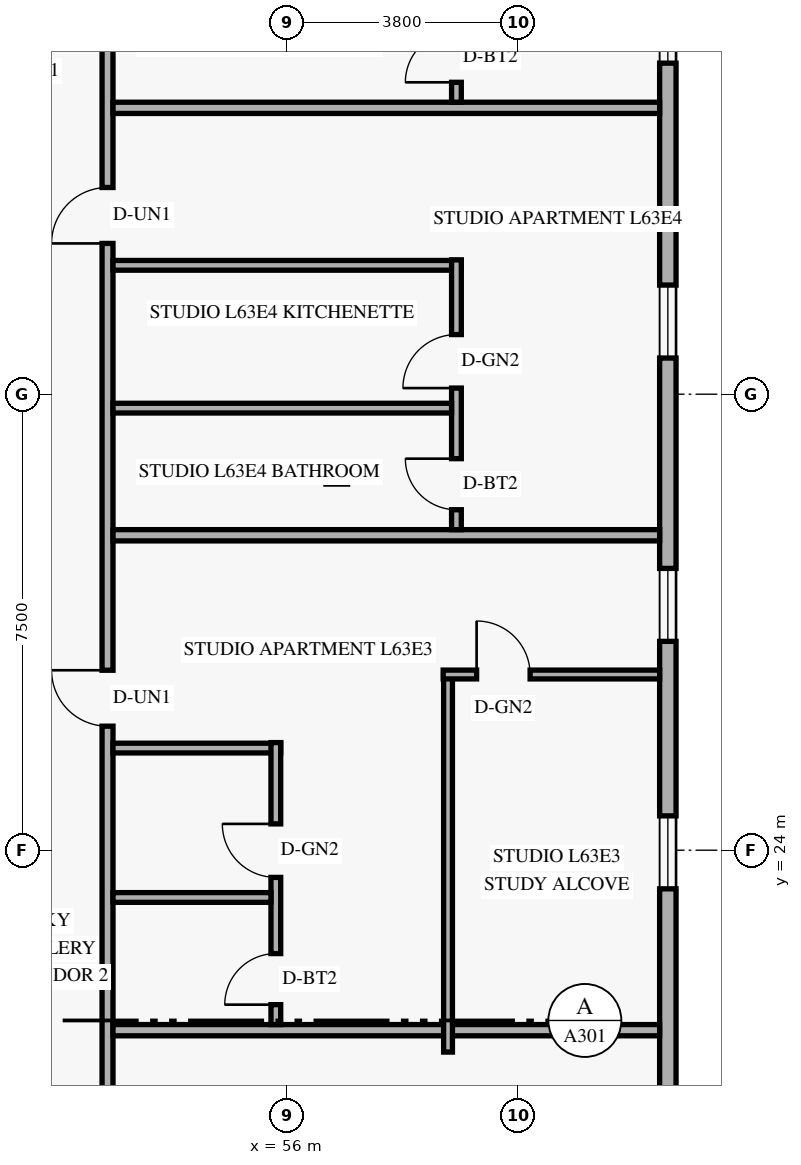
"""IFC4 building model, lengths in metres.
Left out: names, types, materials, properties, quantities, classifications, styles, units other than length and angle.
Written with IfcOpenShell. Run it as: python <this file> out.ifc"""

import sys

from ifc_helpers import new_model, si_unit, direction, frame, frame_2d, origin, origin_2d, place, context, subcontext, project, spatial, rectangle, hollow_rectangle, extrude, element, fill, save


model = new_model("IFC4")
c1 = context("Model", 3, precision=1e-05, world=origin(), true_north=direction((0.0, 1.0)))
c2 = subcontext(c1, "Body", "Model", "MODEL_VIEW")
j1 = project(units=[si_unit("LENGTHUNIT", "METRE"), si_unit("PLANEANGLEUNIT", "RADIAN")], contexts=[c1])
p1 = place(None, origin())
s1 = spatial("IfcSite", under=j1, at=p1, CompositionType="ELEMENT")
p2 = place(p1, origin())
s2 = spatial("IfcBuilding", under=s1, at=p2, CompositionType="ELEMENT")
p3 = place(p2, frame((0.0, 0.0, 242.4)))
s3 = spatial("IfcBuildingStorey", under=s2, at=p3, CompositionType="ELEMENT", Elevation=242.4)
p4 = place(p3, frame((56.716, 30.2, 0.0), z_axis=(0.057884606321, 0.0, 0.998323280481), x_axis=(0.0, 1.0, 0.0)))
e1 = element("IfcColumn", 1, at=p4, inside=s3, PredefinedType="COLUMN", context=c2, shape_type="SweptSolid", body=[
    extrude(hollow_rectangle(XDim=0.356, YDim=0.356, WallThickness=0.016, at=origin_2d()), origin(), (0.0, 0.0, 1.0), 3.606),
])
p5 = place(p3, frame((62.265, 9.12, 0.0), z_axis=(0.0, 0.0, 1.0), x_axis=(0.0, 1.0, 0.0)))
e2 = element("IfcWall", 2, at=p5, inside=s3, PredefinedType="SOLIDWALL", context=c2, shape_type="SweptSolid", body=[
    extrude(rectangle(XDim=29.76, YDim=0.27, at=frame_2d((14.88, 0.0))), origin(), (0.0, 0.0, 1.0), 3.36),
])
p6 = place(p5, frame((1.29, 0.0, 0.85)))
e3 = element("IfcOpeningElement", 3, at=p6, cuts=e2, PredefinedType="OPENING", context=c2, shape_type="SweptSolid", body=[
    extrude(rectangle(XDim=1.2, YDim=1.5, at=frame_2d((0.6, 0.75))), frame((0.0, 0.145, 0.0), z_axis=(0.0, -1.0, 0.0), x_axis=(1.0, 0.0, 0.0)), (0.0, 0.0, 1.0), 0.29),
])
p7 = place(p5, frame((7.25, 0.0, 0.85)))
e4 = element("IfcOpeningElement", 4, at=p7, cuts=e2, PredefinedType="OPENING", context=c2, shape_type="SweptSolid", body=[
    extrude(rectangle(XDim=1.2, YDim=1.5, at=frame_2d((0.6, 0.75))), frame((0.0, 0.145, 0.0), z_axis=(0.0, -1.0, 0.0), x_axis=(1.0, 0.0, 0.0)), (0.0, 0.0, 1.0), 0.29),
])
p8 = place(p5, frame((14.245, 0.0, 0.85)))
e5 = element("IfcOpeningElement", 5, at=p8, cuts=e2, PredefinedType="OPENING", context=c2, shape_type="SweptSolid", body=[
    extrude(rectangle(XDim=1.2, YDim=1.5, at=frame_2d((0.6, 0.75))), frame((0.0, 0.145, 0.0), z_axis=(0.0, -1.0, 0.0), x_axis=(1.0, 0.0, 0.0)), (0.0, 0.0, 1.0), 0.29),
])
p9 = place(p5, frame((18.315, 0.0, 0.85)))
e6 = element("IfcOpeningElement", 6, at=p9, cuts=e2, PredefinedType="OPENING", context=c2, shape_type="SweptSolid", body=[
    extrude(rectangle(XDim=1.2, YDim=1.5, at=frame_2d((0.6, 0.75))), frame((0.0, 0.145, 0.0), z_axis=(0.0, -1.0, 0.0), x_axis=(1.0, 0.0, 0.0)), (0.0, 0.0, 1.0), 0.29),
])
p10 = place(p5, frame((22.975, 0.0, 0.85)))
e7 = element("IfcOpeningElement", 7, at=p10, cuts=e2, PredefinedType="OPENING", context=c2, shape_type="SweptSolid", body=[
    extrude(rectangle(XDim=1.2, YDim=1.5, at=frame_2d((0.6, 0.75))), frame((0.0, 0.145, 0.0), z_axis=(0.0, -1.0, 0.0), x_axis=(1.0, 0.0, 0.0)), (0.0, 0.0, 1.0), 0.29),
])
p11 = place(p5, frame((27.825, 0.0, 0.85)))
e8 = element("IfcOpeningElement", 8, at=p11, cuts=e2, PredefinedType="OPENING", context=c2, shape_type="SweptSolid", body=[
    extrude(rectangle(XDim=1.2, YDim=1.5, at=frame_2d((0.6, 0.75))), frame((0.0, 0.145, 0.0), z_axis=(0.0, -1.0, 0.0), x_axis=(1.0, 0.0, 0.0)), (0.0, 0.0, 1.0), 0.29),
])
p12 = place(p3, frame((53.05, 5.77, 0.0), z_axis=(0.0, 0.0, 1.0), x_axis=(0.0, 1.0, 0.0)))
e9 = element("IfcWall", 9, at=p12, inside=s3, PredefinedType="STANDARD", context=c2, shape_type="SweptSolid", body=[
    extrude(rectangle(XDim=36.46, YDim=0.18, at=frame_2d((18.23, 0.0))), origin(), (0.0, 0.0, 1.0), 2.803),
])
p13 = place(p12, frame((1.357, 0.0, 0.0)))
e10 = element("IfcOpeningElement", 10, at=p13, cuts=e9, PredefinedType="OPENING", context=c2, shape_type="SweptSolid", body=[
    extrude(rectangle(XDim=0.92, YDim=2.15, at=frame_2d((0.46, 1.075))), frame((0.0, 0.1, 0.0), z_axis=(0.0, -1.0, 0.0), x_axis=(1.0, 0.0, 0.0)), (0.0, 0.0, 1.0), 0.2),
])
p14 = place(p12, frame((12.03, 0.0, 0.0)))
e11 = element("IfcOpeningElement", 11, at=p14, cuts=e9, PredefinedType="OPENING", context=c2, shape_type="SweptSolid", body=[
    extrude(rectangle(XDim=0.92, YDim=2.15, at=frame_2d((0.46, 1.075))), frame((0.0, 0.1, 0.0), z_axis=(0.0, -1.0, 0.0), x_axis=(1.0, 0.0, 0.0)), (0.0, 0.0, 1.0), 0.2),
])
p15 = place(p12, frame((20.27, 0.0, 0.0)))
e12 = element("IfcOpeningElement", 12, at=p15, cuts=e9, PredefinedType="OPENING", context=c2, shape_type="SweptSolid", body=[
    extrude(rectangle(XDim=0.92, YDim=2.15, at=frame_2d((0.46, 1.075))), frame((0.0, 0.1, 0.0), z_axis=(0.0, -1.0, 0.0), x_axis=(1.0, 0.0, 0.0)), (0.0, 0.0, 1.0), 0.2),
])
p16 = place(p12, frame((28.21, 0.0, 0.0)))
e13 = element("IfcOpeningElement", 13, at=p16, cuts=e9, PredefinedType="OPENING", context=c2, shape_type="SweptSolid", body=[
    extrude(rectangle(XDim=0.92, YDim=2.15, at=frame_2d((0.46, 1.075))), frame((0.0, 0.1, 0.0), z_axis=(0.0, -1.0, 0.0), x_axis=(1.0, 0.0, 0.0)), (0.0, 0.0, 1.0), 0.2),
])
p17 = place(p12, frame((35.21, 0.0, 0.0)))
e14 = element("IfcOpeningElement", 14, at=p17, cuts=e9, PredefinedType="OPENING", context=c2, shape_type="SweptSolid", body=[
    extrude(rectangle(XDim=0.92, YDim=2.15, at=frame_2d((0.46, 1.075))), frame((0.0, 0.1, 0.0), z_axis=(0.0, -1.0, 0.0), x_axis=(1.0, 0.0, 0.0)), (0.0, 0.0, 1.0), 0.2),
])
p18 = place(p3, frame((53.14, 21.04, 0.0), z_axis=(0.0, 0.0, 1.0), x_axis=(1.0, 0.0, 0.0)))
e15 = element("IfcWall", 15, at=p18, inside=s3, PredefinedType="PARTITIONING", context=c2, shape_type="SweptSolid", body=[
    extrude(rectangle(XDim=8.99, YDim=0.185, at=frame_2d((4.495, 0.0))), origin(), (0.0, 0.0, 1.0), 2.879),
])
p19 = place(p3, frame((53.14, 25.68, 0.0), z_axis=(0.0, 0.0, 1.0), x_axis=(1.0, 0.0, 0.0)))
e16 = element("IfcWall", 16, at=p19, inside=s3, PredefinedType="PLUMBINGWALL", context=c2, shape_type="SweptSolid", body=[
    extrude(rectangle(XDim=2.758, YDim=0.16, at=frame_2d((1.379, 0.0))), origin(), (0.0, 0.0, 1.0), 3.36),
])
p20 = place(p3, frame((55.818, 21.133, 0.0), z_axis=(0.0, 0.0, 1.0), x_axis=(0.0, 1.0, 0.0)))
e17 = element("IfcWall", 17, at=p20, inside=s3, PredefinedType="PLUMBINGWALL", context=c2, shape_type="SweptSolid", body=[
    extrude(rectangle(XDim=4.637, YDim=0.16, at=frame_2d((2.319, 0.0))), origin(), (0.0, 0.0, 1.0), 3.36),
])
p21 = place(p20, frame((0.327, 0.0, 0.0)))
e18 = element("IfcOpeningElement", 18, at=p21, cuts=e17, PredefinedType="OPENING", context=c2, shape_type="SweptSolid", body=[
    extrude(rectangle(XDim=0.84, YDim=2.12, at=frame_2d((0.42, 1.06))), frame((0.0, 0.09, 0.0), z_axis=(0.0, -1.0, 0.0), x_axis=(1.0, 0.0, 0.0)), (0.0, 0.0, 1.0), 0.18),
])
p22 = place(p20, frame((2.42, 0.0, 0.0)))
e19 = element("IfcOpeningElement", 19, at=p22, cuts=e17, PredefinedType="OPENING", context=c2, shape_type="SweptSolid", body=[
    extrude(rectangle(XDim=0.88, YDim=2.12, at=frame_2d((0.44, 1.06))), frame((0.0, 0.09, 0.0), z_axis=(0.0, -1.0, 0.0), x_axis=(1.0, 0.0, 0.0)), (0.0, 0.0, 1.0), 0.18),
])
p23 = place(p3, frame((53.14, 23.223, 0.0), z_axis=(0.0, 0.0, 1.0), x_axis=(1.0, 0.0, 0.0)))
e20 = element("IfcWall", 20, at=p23, inside=s3, PredefinedType="PLUMBINGWALL", context=c2, shape_type="SweptSolid", body=[
    extrude(rectangle(XDim=2.598, YDim=0.16, at=frame_2d((1.299, 0.0))), origin(), (0.0, 0.0, 1.0), 3.36),
])
p24 = place(p3, frame((58.65, 20.68, 0.0), z_axis=(0.0, 0.0, 1.0), x_axis=(0.0, 1.0, 0.0)))
e21 = element("IfcWall", 21, at=p24, inside=s3, PredefinedType="PARTITIONING", context=c2, shape_type="SweptSolid", body=[
    extrude(rectangle(XDim=6.21, YDim=0.145, at=frame_2d((3.105, 0.0))), origin(), (0.0, 0.0, 1.0), 3.36),
])
p25 = place(p3, frame((58.57, 26.89, 0.0), z_axis=(0.0, 0.0, 1.0), x_axis=(1.0, 0.0, 0.0)))
e22 = element("IfcWall", 22, at=p25, inside=s3, PredefinedType="PARTITIONING", context=c2, shape_type="SweptSolid", body=[
    extrude(rectangle(XDim=3.56, YDim=0.145, at=frame_2d((1.78, 0.0))), origin(), (0.0, 0.0, 1.0), 3.36),
])
p26 = place(p25, frame((0.55, 0.0, 0.0)))
e23 = element("IfcOpeningElement", 23, at=p26, cuts=e22, PredefinedType="OPENING", context=c2, shape_type="SweptSolid", body=[
    extrude(rectangle(XDim=0.88, YDim=2.12, at=frame_2d((0.44, 1.06))), frame((0.0, 0.083, 0.0), z_axis=(0.0, -1.0, 0.0), x_axis=(1.0, 0.0, 0.0)), (0.0, 0.0, 1.0), 0.165),
])
p27 = place(p3, frame((53.14, 29.18, 0.0), z_axis=(0.0, 0.0, 1.0), x_axis=(1.0, 0.0, 0.0)))
e24 = element("IfcWall", 24, at=p27, inside=s3, PredefinedType="PARTITIONING", context=c2, shape_type="SweptSolid", body=[
    extrude(rectangle(XDim=8.99, YDim=0.185, at=frame_2d((4.495, 0.0))), origin(), (0.0, 0.0, 1.0), 2.879),
])
p28 = place(p3, frame((53.14, 33.62, 0.0), z_axis=(0.0, 0.0, 1.0), x_axis=(1.0, 0.0, 0.0)))
e25 = element("IfcWall", 25, at=p28, inside=s3, PredefinedType="PLUMBINGWALL", context=c2, shape_type="SweptSolid", body=[
    extrude(rectangle(XDim=5.728, YDim=0.16, at=frame_2d((2.864, 0.0))), origin(), (0.0, 0.0, 1.0), 2.879),
])
p29 = place(p3, frame((58.788, 29.272, 0.0), z_axis=(0.0, 0.0, 1.0), x_axis=(0.0, 1.0, 0.0)))
e26 = element("IfcWall", 26, at=p29, inside=s3, PredefinedType="PLUMBINGWALL", context=c2, shape_type="SweptSolid", body=[
    extrude(rectangle(XDim=4.438, YDim=0.16, at=frame_2d((2.219, 0.0))), origin(), (0.0, 0.0, 1.0), 3.36),
])
p30 = place(p29, frame((0.327, 0.0, 0.0)))
e27 = element("IfcOpeningElement", 27, at=p30, cuts=e26, PredefinedType="OPENING", context=c2, shape_type="SweptSolid", body=[
    extrude(rectangle(XDim=0.84, YDim=2.12, at=frame_2d((0.42, 1.06))), frame((0.0, 0.09, 0.0), z_axis=(0.0, -1.0, 0.0), x_axis=(1.0, 0.0, 0.0)), (0.0, 0.0, 1.0), 0.18),
])
p31 = place(p29, frame((2.329, 0.0, 0.0)))
e28 = element("IfcOpeningElement", 28, at=p31, cuts=e26, PredefinedType="OPENING", context=c2, shape_type="SweptSolid", body=[
    extrude(rectangle(XDim=0.88, YDim=2.12, at=frame_2d((0.44, 1.06))), frame((0.0, 0.09, 0.0), z_axis=(0.0, -1.0, 0.0), x_axis=(1.0, 0.0, 0.0)), (0.0, 0.0, 1.0), 0.18),
])
p32 = place(p3, frame((53.14, 31.271, 0.0), z_axis=(0.0, 0.0, 1.0), x_axis=(1.0, 0.0, 0.0)))
e29 = element("IfcWall", 29, at=p32, inside=s3, PredefinedType="PLUMBINGWALL", context=c2, shape_type="SweptSolid", body=[
    extrude(rectangle(XDim=5.568, YDim=0.16, at=frame_2d((2.784, 0.0))), origin(), (0.0, 0.0, 1.0), 2.879),
])
p33 = place(p3, frame((53.14, 36.21, 0.0), z_axis=(0.0, 0.0, 1.0), x_axis=(1.0, 0.0, 0.0)))
e30 = element("IfcWall", 30, at=p33, inside=s3, PredefinedType="PARTITIONING", context=c2, shape_type="SweptSolid", body=[
    extrude(rectangle(XDim=8.99, YDim=0.185, at=frame_2d((4.495, 0.0))), origin(), (0.0, 0.0, 1.0), 2.879),
])
p34 = place(p3, frame((58.788, 36.302, 0.0), z_axis=(0.0, 0.0, 1.0), x_axis=(0.0, 1.0, 0.0)))
e31 = element("IfcWall", 31, at=p34, inside=s3, PredefinedType="PLUMBINGWALL", context=c2, shape_type="SweptSolid", body=[
    extrude(rectangle(XDim=4.438, YDim=0.16, at=frame_2d((2.219, 0.0))), origin(), (0.0, 0.0, 1.0), 3.36),
])
p35 = place(p34, frame((0.327, 0.0, 0.0)))
e32 = element("IfcOpeningElement", 32, at=p35, cuts=e31, PredefinedType="OPENING", context=c2, shape_type="SweptSolid", body=[
    extrude(rectangle(XDim=0.84, YDim=2.12, at=frame_2d((0.42, 1.06))), frame((0.0, 0.09, 0.0), z_axis=(0.0, -1.0, 0.0), x_axis=(1.0, 0.0, 0.0)), (0.0, 0.0, 1.0), 0.18),
])
p36 = place(p34, frame((2.329, 0.0, 0.0)))
e33 = element("IfcOpeningElement", 33, at=p36, cuts=e31, PredefinedType="OPENING", context=c2, shape_type="SweptSolid", body=[
    extrude(rectangle(XDim=0.88, YDim=2.12, at=frame_2d((0.44, 1.06))), frame((0.0, 0.09, 0.0), z_axis=(0.0, -1.0, 0.0), x_axis=(1.0, 0.0, 0.0)), (0.0, 0.0, 1.0), 0.18),
])
p37 = place(p8, origin())
e34 = element("IfcWindow", 34, at=p37, inside=s3, PartitioningType="SINGLE_PANEL", PredefinedType="WINDOW", context=c2, shape_type="SweptSolid", body=[
    extrude(rectangle(XDim=1.2, YDim=1.5, at=frame_2d((0.6, 0.75))), frame((0.0, 0.03, 0.0), z_axis=(0.0, -1.0, 0.0), x_axis=(1.0, 0.0, 0.0)), (0.0, 0.0, 1.0), 0.06),
])
fill(e5, e34)
p38 = place(p9, origin())
e35 = element("IfcWindow", 35, at=p38, inside=s3, PartitioningType="SINGLE_PANEL", PredefinedType="WINDOW", context=c2, shape_type="SweptSolid", body=[
    extrude(rectangle(XDim=1.2, YDim=1.5, at=frame_2d((0.6, 0.75))), frame((0.0, 0.03, 0.0), z_axis=(0.0, -1.0, 0.0), x_axis=(1.0, 0.0, 0.0)), (0.0, 0.0, 1.0), 0.06),
])
fill(e6, e35)
p39 = place(p10, origin())
e36 = element("IfcWindow", 36, at=p39, inside=s3, PartitioningType="SINGLE_PANEL", PredefinedType="WINDOW", context=c2, shape_type="SweptSolid", body=[
    extrude(rectangle(XDim=1.2, YDim=1.5, at=frame_2d((0.6, 0.75))), frame((0.0, 0.03, 0.0), z_axis=(0.0, -1.0, 0.0), x_axis=(1.0, 0.0, 0.0)), (0.0, 0.0, 1.0), 0.06),
])
fill(e7, e36)
p40 = place(p11, origin())
e37 = element("IfcWindow", 37, at=p40, inside=s3, PartitioningType="SINGLE_PANEL", PredefinedType="WINDOW", context=c2, shape_type="SweptSolid", body=[
    extrude(rectangle(XDim=1.2, YDim=1.5, at=frame_2d((0.6, 0.75))), frame((0.0, 0.03, 0.0), z_axis=(0.0, -1.0, 0.0), x_axis=(1.0, 0.0, 0.0)), (0.0, 0.0, 1.0), 0.06),
])
fill(e8, e37)
p41 = place(p26, origin())
e38 = element("IfcDoor", 38, at=p41, inside=s3, OperationType="SINGLE_SWING_LEFT", PredefinedType="DOOR", context=c2, shape_type="SweptSolid", body=[
    extrude(rectangle(XDim=0.88, YDim=2.12, at=frame_2d((0.44, 1.06))), frame((0.0, 0.025, 0.0), z_axis=(0.0, -1.0, 0.0), x_axis=(1.0, 0.0, 0.0)), (0.0, 0.0, 1.0), 0.05),
])
fill(e23, e38)
p42 = place(p15, origin())
e39 = element("IfcDoor", 39, at=p42, inside=s3, OperationType="SINGLE_SWING_RIGHT", PredefinedType="DOOR", context=c2, shape_type="SweptSolid", body=[
    extrude(rectangle(XDim=0.92, YDim=2.15, at=frame_2d((0.46, 1.075))), frame((0.0, 0.025, 0.0), z_axis=(0.0, -1.0, 0.0), x_axis=(1.0, 0.0, 0.0)), (0.0, 0.0, 1.0), 0.05),
])
fill(e12, e39)
p43 = place(p21, origin())
e40 = element("IfcDoor", 40, at=p43, inside=s3, OperationType="SINGLE_SWING_LEFT", PredefinedType="DOOR", context=c2, shape_type="SweptSolid", body=[
    extrude(rectangle(XDim=0.84, YDim=2.12, at=frame_2d((0.42, 1.06))), frame((0.0, 0.025, 0.0), z_axis=(0.0, -1.0, 0.0), x_axis=(1.0, 0.0, 0.0)), (0.0, 0.0, 1.0), 0.05),
])
fill(e18, e40)
p44 = place(p22, origin())
e41 = element("IfcDoor", 41, at=p44, inside=s3, OperationType="SINGLE_SWING_RIGHT", PredefinedType="DOOR", context=c2, shape_type="SweptSolid", body=[
    extrude(rectangle(XDim=0.88, YDim=2.12, at=frame_2d((0.44, 1.06))), frame((0.0, 0.025, 0.0), z_axis=(0.0, -1.0, 0.0), x_axis=(1.0, 0.0, 0.0)), (0.0, 0.0, 1.0), 0.05),
])
fill(e19, e41)
p45 = place(p16, origin())
e42 = element("IfcDoor", 42, at=p45, inside=s3, OperationType="SINGLE_SWING_LEFT", PredefinedType="DOOR", context=c2, shape_type="SweptSolid", body=[
    extrude(rectangle(XDim=0.92, YDim=2.15, at=frame_2d((0.46, 1.075))), frame((0.0, 0.025, 0.0), z_axis=(0.0, -1.0, 0.0), x_axis=(1.0, 0.0, 0.0)), (0.0, 0.0, 1.0), 0.05),
])
fill(e13, e42)
p46 = place(p30, origin())
e43 = element("IfcDoor", 43, at=p46, inside=s3, OperationType="SINGLE_SWING_RIGHT", PredefinedType="DOOR", context=c2, shape_type="SweptSolid", body=[
    extrude(rectangle(XDim=0.84, YDim=2.12, at=frame_2d((0.42, 1.06))), frame((0.0, 0.025, 0.0), z_axis=(0.0, -1.0, 0.0), x_axis=(1.0, 0.0, 0.0)), (0.0, 0.0, 1.0), 0.05),
])
fill(e27, e43)
p47 = place(p31, origin())
e44 = element("IfcDoor", 44, at=p47, inside=s3, OperationType="SINGLE_SWING_LEFT", PredefinedType="DOOR", context=c2, shape_type="SweptSolid", body=[
    extrude(rectangle(XDim=0.88, YDim=2.12, at=frame_2d((0.44, 1.06))), frame((0.0, 0.025, 0.0), z_axis=(0.0, -1.0, 0.0), x_axis=(1.0, 0.0, 0.0)), (0.0, 0.0, 1.0), 0.05),
])
fill(e28, e44)
p48 = place(p35, origin())
e45 = element("IfcDoor", 45, at=p48, inside=s3, OperationType="SINGLE_SWING_LEFT", PredefinedType="DOOR", context=c2, shape_type="SweptSolid", body=[
    extrude(rectangle(XDim=0.84, YDim=2.12, at=frame_2d((0.42, 1.06))), frame((0.0, 0.025, 0.0), z_axis=(0.0, -1.0, 0.0), x_axis=(1.0, 0.0, 0.0)), (0.0, 0.0, 1.0), 0.05),
])
fill(e32, e45)
save(model, sys.argv[1])
